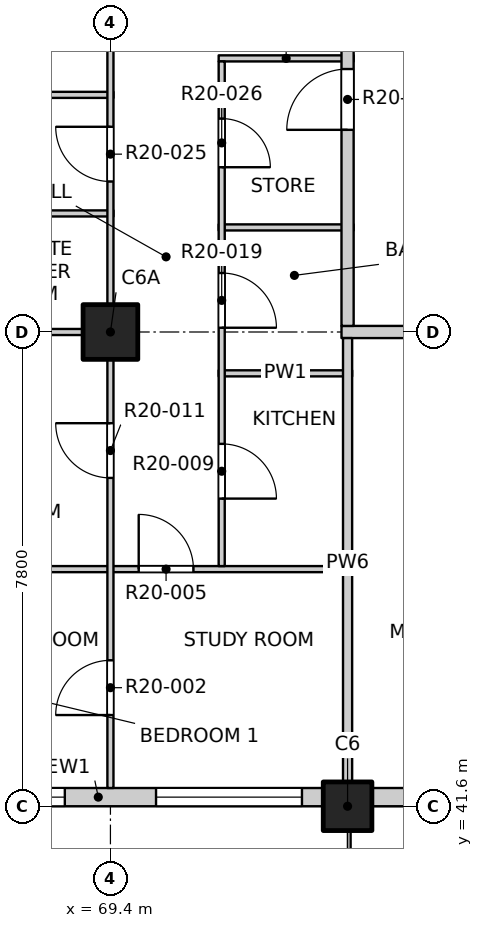
"""IFC4 building model, lengths in metres.
Left out: names, types, materials, properties, quantities, classifications, styles, units other than length and angle.
Written with IfcOpenShell. Run it as: python <this file> out.ifc"""

import sys

from ifc_helpers import new_model, si_unit, direction, frame, frame_2d, origin, origin_2d, place, context, subcontext, project, spatial, rectangle, extrude, element, fill, save


model = new_model("IFC4")
c1 = context("Model", 3, precision=1e-05, world=origin(), true_north=direction((0.0, 1.0)))
c2 = subcontext(c1, "Body", "Model", "MODEL_VIEW")
j1 = project(units=[si_unit("LENGTHUNIT", "METRE"), si_unit("PLANEANGLEUNIT", "RADIAN")], contexts=[c1])
p1 = place(None, origin())
s1 = spatial("IfcSite", under=j1, at=p1, CompositionType="ELEMENT")
p2 = place(p1, origin())
s2 = spatial("IfcBuilding", under=s1, at=p2, CompositionType="ELEMENT")
p3 = place(p2, frame((0.0, 0.0, 204.1)))
s3 = spatial("IfcBuildingStorey", under=s2, at=p3, CompositionType="ELEMENT", Elevation=204.1)
p4 = place(p3, frame((73.3, 41.6, -0.25), z_axis=(0.0, 0.0, 1.0), x_axis=(1.0, 0.0, 0.0)))
e1 = element("IfcColumn", 1, at=p4, inside=s3, PredefinedType="COLUMN", context=c2, shape_type="SweptSolid", body=[
    extrude(rectangle(XDim=0.8, YDim=0.8, at=origin_2d()), origin(), (0.0, 0.0, 1.0), 3.4),
])
p5 = place(p3, frame((69.4, 49.4, -0.25), z_axis=(0.0, 0.0, 1.0), x_axis=(1.0, 0.0, 0.0)))
e2 = element("IfcColumn", 2, at=p5, inside=s3, PredefinedType="COLUMN", context=c2, shape_type="SweptSolid", body=[
    extrude(rectangle(XDim=0.9, YDim=0.9, at=origin_2d()), origin(), (0.0, 0.0, 1.0), 3.4),
])
p6 = place(p3, frame((65.5, 41.75, 0.0), z_axis=(0.0, 0.0, 1.0), x_axis=(1.0, 0.0, 0.0)))
e3 = element("IfcWall", 3, at=p6, inside=s3, PredefinedType="SOLIDWALL", context=c2, shape_type="SweptSolid", body=[
    extrude(rectangle(XDim=7.4, YDim=0.3, at=frame_2d((3.7, 0.0))), origin(), (0.0, 0.0, 1.0), 2.7),
])
p7 = place(p6, frame((0.75, 0.0, 0.9)))
e4 = element("IfcOpeningElement", 4, at=p7, cuts=e3, PredefinedType="OPENING", context=c2, shape_type="SweptSolid", body=[
    extrude(rectangle(XDim=2.4, YDim=1.8, at=frame_2d((1.2, 0.9))), frame((0.0, 0.16, 0.0), z_axis=(0.0, -1.0, 0.0), x_axis=(1.0, 0.0, 0.0)), (0.0, 0.0, 1.0), 0.32),
])
p8 = place(p6, frame((4.65, 0.0, 0.9)))
e5 = element("IfcOpeningElement", 5, at=p8, cuts=e3, PredefinedType="OPENING", context=c2, shape_type="SweptSolid", body=[
    extrude(rectangle(XDim=2.4, YDim=1.8, at=frame_2d((1.2, 0.9))), frame((0.0, 0.16, 0.0), z_axis=(0.0, -1.0, 0.0), x_axis=(1.0, 0.0, 0.0)), (0.0, 0.0, 1.0), 0.32),
])
p9 = place(p3, frame((73.7, 41.75, 0.0), z_axis=(0.0, 0.0, 1.0), x_axis=(1.0, 0.0, 0.0)))
e6 = element("IfcWall", 6, at=p9, inside=s3, PredefinedType="SOLIDWALL", context=c2, shape_type="SweptSolid", body=[
    extrude(rectangle(XDim=7.0, YDim=0.3, at=frame_2d((3.5, 0.0))), origin(), (0.0, 0.0, 1.0), 2.7),
])
p10 = place(p9, frame((0.65, 0.0, 0.0)))
e7 = element("IfcOpeningElement", 7, at=p10, cuts=e6, PredefinedType="OPENING", context=c2, shape_type="SweptSolid", body=[
    extrude(rectangle(XDim=1.8, YDim=2.4, at=frame_2d((0.9, 1.2))), frame((0.0, 0.16, 0.0), z_axis=(0.0, -1.0, 0.0), x_axis=(1.0, 0.0, 0.0)), (0.0, 0.0, 1.0), 0.32),
])
p11 = place(p9, frame((4.25, 0.0, 0.9)))
e8 = element("IfcOpeningElement", 8, at=p11, cuts=e6, PredefinedType="OPENING", context=c2, shape_type="SweptSolid", body=[
    extrude(rectangle(XDim=2.4, YDim=1.8, at=frame_2d((1.2, 0.9))), frame((0.0, 0.16, 0.0), z_axis=(0.0, -1.0, 0.0), x_axis=(1.0, 0.0, 0.0)), (0.0, 0.0, 1.0), 0.32),
])
p12 = place(p3, frame((61.9, 45.5, 0.0), z_axis=(0.0, 0.0, 1.0), x_axis=(1.0, 0.0, 0.0)))
e9 = element("IfcWall", 9, at=p12, inside=s3, PredefinedType="PARTITIONING", context=c2, shape_type="SweptSolid", body=[
    extrude(rectangle(XDim=11.475, YDim=0.1, at=frame_2d((5.737, 0.0))), origin(), (0.0, 0.0, 1.0), 3.15),
])
p13 = place(p12, frame((7.965, 0.0, 0.0)))
e10 = element("IfcOpeningElement", 10, at=p13, cuts=e9, PredefinedType="OPENING", context=c2, shape_type="SweptSolid", body=[
    extrude(rectangle(XDim=0.9, YDim=2.1, at=frame_2d((0.45, 1.05))), frame((0.0, 0.06, 0.0), z_axis=(0.0, -1.0, 0.0), x_axis=(1.0, 0.0, 0.0)), (0.0, 0.0, 1.0), 0.12),
])
p14 = place(p3, frame((71.18, 48.72, 0.0), z_axis=(0.0, 0.0, 1.0), x_axis=(1.0, 0.0, 0.0)))
e11 = element("IfcWall", 11, at=p14, inside=s3, PredefinedType="PARTITIONING", context=c2, shape_type="SweptSolid", body=[
    extrude(rectangle(XDim=2.195, YDim=0.1, at=frame_2d((1.097, 0.0))), origin(), (0.0, 0.0, 1.0), 3.15),
])
p15 = place(p3, frame((61.9, 49.4, 0.0), z_axis=(0.0, 0.0, 1.0), x_axis=(1.0, 0.0, 0.0)))
e12 = element("IfcWall", 12, at=p15, inside=s3, PredefinedType="PARTITIONING", context=c2, shape_type="SweptSolid", body=[
    extrude(rectangle(XDim=7.55, YDim=0.1, at=frame_2d((3.775, 0.0))), origin(), (0.0, 0.0, 1.0), 3.15),
])
p16 = place(p3, frame((73.2, 49.4, 0.0), z_axis=(0.0, 0.0, 1.0), x_axis=(1.0, 0.0, 0.0)))
e13 = element("IfcWall", 13, at=p16, inside=s3, PredefinedType="PARTITIONING", context=c2, shape_type="SweptSolid", body=[
    extrude(rectangle(XDim=23.6, YDim=0.2, at=frame_2d((11.8, 0.0))), origin(), (0.0, 0.0, 1.0), 3.15),
])
p17 = place(p16, frame((1.6, 0.0, 0.0)))
e14 = element("IfcOpeningElement", 14, at=p17, cuts=e13, PredefinedType="OPENING", context=c2, shape_type="SweptSolid", body=[
    extrude(rectangle(XDim=0.9, YDim=2.1, at=frame_2d((0.45, 1.05))), frame((0.0, 0.11, 0.0), z_axis=(0.0, -1.0, 0.0), x_axis=(1.0, 0.0, 0.0)), (0.0, 0.0, 1.0), 0.22),
])
p18 = place(p16, frame((5.5, 0.0, 0.0)))
e15 = element("IfcOpeningElement", 15, at=p18, cuts=e13, PredefinedType="OPENING", context=c2, shape_type="SweptSolid", body=[
    extrude(rectangle(XDim=0.9, YDim=2.1, at=frame_2d((0.45, 1.05))), frame((0.0, 0.11, 0.0), z_axis=(0.0, -1.0, 0.0), x_axis=(1.0, 0.0, 0.0)), (0.0, 0.0, 1.0), 0.22),
])
p19 = place(p16, frame((12.375, 0.0, 0.0)))
e16 = element("IfcOpeningElement", 16, at=p19, cuts=e13, PredefinedType="OPENING", context=c2, shape_type="SweptSolid", body=[
    extrude(rectangle(XDim=1.2, YDim=2.1, at=frame_2d((0.6, 1.05))), frame((0.0, 0.11, 0.0), z_axis=(0.0, -1.0, 0.0), x_axis=(1.0, 0.0, 0.0)), (0.0, 0.0, 1.0), 0.22),
])
p20 = place(p16, frame((20.15, 0.0, 0.0)))
e17 = element("IfcOpeningElement", 17, at=p20, cuts=e13, PredefinedType="OPENING", context=c2, shape_type="SweptSolid", body=[
    extrude(rectangle(XDim=1.2, YDim=2.1, at=frame_2d((0.6, 1.05))), frame((0.0, 0.11, 0.0), z_axis=(0.0, -1.0, 0.0), x_axis=(1.0, 0.0, 0.0)), (0.0, 0.0, 1.0), 0.22),
])
p21 = place(p3, frame((71.18, 51.12, 0.0), z_axis=(0.0, 0.0, 1.0), x_axis=(1.0, 0.0, 0.0)))
e18 = element("IfcWall", 18, at=p21, inside=s3, PredefinedType="PARTITIONING", context=c2, shape_type="SweptSolid", body=[
    extrude(rectangle(XDim=2.22, YDim=0.1, at=frame_2d((1.11, 0.0))), origin(), (0.0, 0.0, 1.0), 3.15),
])
p22 = place(p3, frame((66.05, 51.35, 0.0), z_axis=(0.0, 0.0, 1.0), x_axis=(1.0, 0.0, 0.0)))
e19 = element("IfcWall", 19, at=p22, inside=s3, PredefinedType="PARTITIONING", context=c2, shape_type="SweptSolid", body=[
    extrude(rectangle(XDim=3.4, YDim=0.1, at=frame_2d((1.7, 0.0))), origin(), (0.0, 0.0, 1.0), 3.15),
])
p23 = place(p3, frame((61.9, 53.3, 0.0), z_axis=(0.0, 0.0, 1.0), x_axis=(1.0, 0.0, 0.0)))
e20 = element("IfcWall", 20, at=p23, inside=s3, PredefinedType="PARTITIONING", context=c2, shape_type="SweptSolid", body=[
    extrude(rectangle(XDim=7.55, YDim=0.1, at=frame_2d((3.775, 0.0))), origin(), (0.0, 0.0, 1.0), 3.15),
])
p24 = place(p3, frame((71.18, 53.9, 0.0), z_axis=(0.0, 0.0, 1.0), x_axis=(1.0, 0.0, 0.0)))
e21 = element("IfcWall", 21, at=p24, inside=s3, PredefinedType="PARTITIONING", context=c2, shape_type="SweptSolid", body=[
    extrude(rectangle(XDim=2.22, YDim=0.1, at=frame_2d((1.11, 0.0))), origin(), (0.0, 0.0, 1.0), 3.15),
])
p25 = place(p3, frame((69.4, 41.9, 0.0), z_axis=(0.0, 0.0, 1.0), x_axis=(0.0, 1.0, 0.0)))
e22 = element("IfcWall", 22, at=p25, inside=s3, PredefinedType="PARTITIONING", context=c2, shape_type="SweptSolid", body=[
    extrude(rectangle(XDim=46.2, YDim=0.1, at=frame_2d((23.1, 0.0))), origin(), (0.0, 0.0, 1.0), 3.15),
])
p26 = place(p25, frame((1.2, 0.0, 0.0)))
e23 = element("IfcOpeningElement", 23, at=p26, cuts=e22, PredefinedType="OPENING", context=c2, shape_type="SweptSolid", body=[
    extrude(rectangle(XDim=0.9, YDim=2.1, at=frame_2d((0.45, 1.05))), frame((0.0, 0.06, 0.0), z_axis=(0.0, -1.0, 0.0), x_axis=(1.0, 0.0, 0.0)), (0.0, 0.0, 1.0), 0.12),
])
p27 = place(p25, frame((5.1, 0.0, 0.0)))
e24 = element("IfcOpeningElement", 24, at=p27, cuts=e22, PredefinedType="OPENING", context=c2, shape_type="SweptSolid", body=[
    extrude(rectangle(XDim=0.9, YDim=2.1, at=frame_2d((0.45, 1.05))), frame((0.0, 0.06, 0.0), z_axis=(0.0, -1.0, 0.0), x_axis=(1.0, 0.0, 0.0)), (0.0, 0.0, 1.0), 0.12),
])
p28 = place(p25, frame((9.975, 0.0, 0.0)))
e25 = element("IfcOpeningElement", 25, at=p28, cuts=e22, PredefinedType="OPENING", context=c2, shape_type="SweptSolid", body=[
    extrude(rectangle(XDim=0.9, YDim=2.1, at=frame_2d((0.45, 1.05))), frame((0.0, 0.06, 0.0), z_axis=(0.0, -1.0, 0.0), x_axis=(1.0, 0.0, 0.0)), (0.0, 0.0, 1.0), 0.12),
])
p29 = place(p25, frame((12.9, 0.0, 0.0)))
e26 = element("IfcOpeningElement", 26, at=p29, cuts=e22, PredefinedType="OPENING", context=c2, shape_type="SweptSolid", body=[
    extrude(rectangle(XDim=0.9, YDim=2.1, at=frame_2d((0.45, 1.05))), frame((0.0, 0.06, 0.0), z_axis=(0.0, -1.0, 0.0), x_axis=(1.0, 0.0, 0.0)), (0.0, 0.0, 1.0), 0.12),
])
p30 = place(p25, frame((17.775, 0.0, 0.0)))
e27 = element("IfcOpeningElement", 27, at=p30, cuts=e22, PredefinedType="OPENING", context=c2, shape_type="SweptSolid", body=[
    extrude(rectangle(XDim=0.9, YDim=2.1, at=frame_2d((0.45, 1.05))), frame((0.0, 0.06, 0.0), z_axis=(0.0, -1.0, 0.0), x_axis=(1.0, 0.0, 0.0)), (0.0, 0.0, 1.0), 0.12),
])
p31 = place(p25, frame((21.625, 0.0, 0.0)))
e28 = element("IfcOpeningElement", 28, at=p31, cuts=e22, PredefinedType="OPENING", context=c2, shape_type="SweptSolid", body=[
    extrude(rectangle(XDim=0.9, YDim=2.1, at=frame_2d((0.45, 1.05))), frame((0.0, 0.06, 0.0), z_axis=(0.0, -1.0, 0.0), x_axis=(1.0, 0.0, 0.0)), (0.0, 0.0, 1.0), 0.12),
])
p32 = place(p25, frame((24.6, 0.0, 0.0)))
e29 = element("IfcOpeningElement", 29, at=p32, cuts=e22, PredefinedType="OPENING", context=c2, shape_type="SweptSolid", body=[
    extrude(rectangle(XDim=0.9, YDim=2.1, at=frame_2d((0.45, 1.05))), frame((0.0, 0.06, 0.0), z_axis=(0.0, -1.0, 0.0), x_axis=(1.0, 0.0, 0.0)), (0.0, 0.0, 1.0), 0.12),
])
p33 = place(p25, frame((28.5, 0.0, 0.0)))
e30 = element("IfcOpeningElement", 30, at=p33, cuts=e22, PredefinedType="OPENING", context=c2, shape_type="SweptSolid", body=[
    extrude(rectangle(XDim=0.9, YDim=2.1, at=frame_2d((0.45, 1.05))), frame((0.0, 0.06, 0.0), z_axis=(0.0, -1.0, 0.0), x_axis=(1.0, 0.0, 0.0)), (0.0, 0.0, 1.0), 0.12),
])
p34 = place(p25, frame((33.375, 0.0, 0.0)))
e31 = element("IfcOpeningElement", 31, at=p34, cuts=e22, PredefinedType="OPENING", context=c2, shape_type="SweptSolid", body=[
    extrude(rectangle(XDim=0.9, YDim=2.1, at=frame_2d((0.45, 1.05))), frame((0.0, 0.06, 0.0), z_axis=(0.0, -1.0, 0.0), x_axis=(1.0, 0.0, 0.0)), (0.0, 0.0, 1.0), 0.12),
])
p35 = place(p25, frame((37.225, 0.0, 0.0)))
e32 = element("IfcOpeningElement", 32, at=p35, cuts=e22, PredefinedType="OPENING", context=c2, shape_type="SweptSolid", body=[
    extrude(rectangle(XDim=0.9, YDim=2.1, at=frame_2d((0.45, 1.05))), frame((0.0, 0.06, 0.0), z_axis=(0.0, -1.0, 0.0), x_axis=(1.0, 0.0, 0.0)), (0.0, 0.0, 1.0), 0.12),
])
p36 = place(p25, frame((40.2, 0.0, 0.0)))
e33 = element("IfcOpeningElement", 33, at=p36, cuts=e22, PredefinedType="OPENING", context=c2, shape_type="SweptSolid", body=[
    extrude(rectangle(XDim=0.9, YDim=2.1, at=frame_2d((0.45, 1.05))), frame((0.0, 0.06, 0.0), z_axis=(0.0, -1.0, 0.0), x_axis=(1.0, 0.0, 0.0)), (0.0, 0.0, 1.0), 0.12),
])
p37 = place(p25, frame((44.1, 0.0, 0.0)))
e34 = element("IfcOpeningElement", 34, at=p37, cuts=e22, PredefinedType="OPENING", context=c2, shape_type="SweptSolid", body=[
    extrude(rectangle(XDim=0.9, YDim=2.1, at=frame_2d((0.45, 1.05))), frame((0.0, 0.06, 0.0), z_axis=(0.0, -1.0, 0.0), x_axis=(1.0, 0.0, 0.0)), (0.0, 0.0, 1.0), 0.12),
])
p38 = place(p3, frame((71.23, 45.55, 0.0), z_axis=(0.0, 0.0, 1.0), x_axis=(0.0, 1.0, 0.0)))
e35 = element("IfcWall", 35, at=p38, inside=s3, PredefinedType="PARTITIONING", context=c2, shape_type="SweptSolid", body=[
    extrude(rectangle(XDim=8.3, YDim=0.1, at=frame_2d((4.15, 0.0))), origin(), (0.0, 0.0, 1.0), 3.15),
])
p39 = place(p38, frame((1.11, 0.0, 0.0)))
e36 = element("IfcOpeningElement", 36, at=p39, cuts=e35, PredefinedType="OPENING", context=c2, shape_type="SweptSolid", body=[
    extrude(rectangle(XDim=0.9, YDim=2.1, at=frame_2d((0.45, 1.05))), frame((0.0, 0.06, 0.0), z_axis=(0.0, -1.0, 0.0), x_axis=(1.0, 0.0, 0.0)), (0.0, 0.0, 1.0), 0.12),
])
p40 = place(p38, frame((3.92, 0.0, 0.0)))
e37 = element("IfcOpeningElement", 37, at=p40, cuts=e35, PredefinedType="OPENING", context=c2, shape_type="SweptSolid", body=[
    extrude(rectangle(XDim=0.9, YDim=2.1, at=frame_2d((0.45, 1.05))), frame((0.0, 0.06, 0.0), z_axis=(0.0, -1.0, 0.0), x_axis=(1.0, 0.0, 0.0)), (0.0, 0.0, 1.0), 0.12),
])
p41 = place(p38, frame((6.56, 0.0, 0.0)))
e38 = element("IfcOpeningElement", 38, at=p41, cuts=e35, PredefinedType="OPENING", context=c2, shape_type="SweptSolid", body=[
    extrude(rectangle(XDim=0.8, YDim=2.1, at=frame_2d((0.4, 1.05))), frame((0.0, 0.06, 0.0), z_axis=(0.0, -1.0, 0.0), x_axis=(1.0, 0.0, 0.0)), (0.0, 0.0, 1.0), 0.12),
])
p42 = place(p3, frame((73.3, 41.9, 0.0), z_axis=(0.0, 0.0, 1.0), x_axis=(0.0, 1.0, 0.0)))
e39 = element("IfcWall", 39, at=p42, inside=s3, PredefinedType="PARTITIONING", context=c2, shape_type="SweptSolid", body=[
    extrude(rectangle(XDim=7.4, YDim=0.15, at=frame_2d((3.7, 0.0))), origin(), (0.0, 0.0, 1.0), 3.15),
])
p43 = place(p3, frame((73.3, 49.5, 0.0), z_axis=(0.0, 0.0, 1.0), x_axis=(0.0, 1.0, 0.0)))
e40 = element("IfcWall", 40, at=p43, inside=s3, PredefinedType="PARTITIONING", context=c2, shape_type="SweptSolid", body=[
    extrude(rectangle(XDim=34.9, YDim=0.2, at=frame_2d((17.45, 0.0))), origin(), (0.0, 0.0, 1.0), 3.15),
])
p44 = place(p43, frame((3.225, 0.0, 0.0)))
e41 = element("IfcOpeningElement", 41, at=p44, cuts=e40, PredefinedType="OPENING", context=c2, shape_type="SweptSolid", body=[
    extrude(rectangle(XDim=1.0, YDim=2.1, at=frame_2d((0.5, 1.05))), frame((0.0, 0.11, 0.0), z_axis=(0.0, -1.0, 0.0), x_axis=(1.0, 0.0, 0.0)), (0.0, 0.0, 1.0), 0.22),
])
p45 = place(p43, frame((25.125, 0.0, 0.0)))
e42 = element("IfcOpeningElement", 42, at=p45, cuts=e40, PredefinedType="OPENING", context=c2, shape_type="SweptSolid", body=[
    extrude(rectangle(XDim=1.0, YDim=2.1, at=frame_2d((0.5, 1.05))), frame((0.0, 0.11, 0.0), z_axis=(0.0, -1.0, 0.0), x_axis=(1.0, 0.0, 0.0)), (0.0, 0.0, 1.0), 0.22),
])
p46 = place(p43, frame((31.475, 0.0, 0.0)))
e43 = element("IfcOpeningElement", 43, at=p46, cuts=e40, PredefinedType="OPENING", context=c2, shape_type="SweptSolid", body=[
    extrude(rectangle(XDim=1.0, YDim=2.1, at=frame_2d((0.5, 1.05))), frame((0.0, 0.11, 0.0), z_axis=(0.0, -1.0, 0.0), x_axis=(1.0, 0.0, 0.0)), (0.0, 0.0, 1.0), 0.22),
])
p47 = place(p7, origin())
e44 = element("IfcWindow", 44, at=p47, inside=s3, PartitioningType="DOUBLE_PANEL_VERTICAL", PredefinedType="WINDOW", context=c2, shape_type="SweptSolid", body=[
    extrude(rectangle(XDim=2.4, YDim=1.8, at=frame_2d((1.2, 0.9))), frame((0.0, 0.03, 0.0), z_axis=(0.0, -1.0, 0.0), x_axis=(1.0, 0.0, 0.0)), (0.0, 0.0, 1.0), 0.06),
])
fill(e4, e44)
p48 = place(p8, origin())
e45 = element("IfcWindow", 45, at=p48, inside=s3, PartitioningType="DOUBLE_PANEL_VERTICAL", PredefinedType="WINDOW", context=c2, shape_type="SweptSolid", body=[
    extrude(rectangle(XDim=2.4, YDim=1.8, at=frame_2d((1.2, 0.9))), frame((0.0, 0.03, 0.0), z_axis=(0.0, -1.0, 0.0), x_axis=(1.0, 0.0, 0.0)), (0.0, 0.0, 1.0), 0.06),
])
fill(e5, e45)
p49 = place(p26, origin())
e46 = element("IfcDoor", 46, at=p49, inside=s3, OperationType="SINGLE_SWING_LEFT", PredefinedType="DOOR", context=c2, shape_type="SweptSolid", body=[
    extrude(rectangle(XDim=0.9, YDim=2.1, at=frame_2d((0.45, 1.05))), frame((0.0, 0.025, 0.0), z_axis=(0.0, -1.0, 0.0), x_axis=(1.0, 0.0, 0.0)), (0.0, 0.0, 1.0), 0.05),
])
fill(e23, e46)
p50 = place(p13, origin())
e47 = element("IfcDoor", 47, at=p50, inside=s3, OperationType="SINGLE_SWING_LEFT", PredefinedType="DOOR", context=c2, shape_type="SweptSolid", body=[
    extrude(rectangle(XDim=0.9, YDim=2.1, at=frame_2d((0.45, 1.05))), frame((0.0, 0.025, 0.0), z_axis=(0.0, -1.0, 0.0), x_axis=(1.0, 0.0, 0.0)), (0.0, 0.0, 1.0), 0.05),
])
fill(e10, e47)
p51 = place(p39, origin())
e48 = element("IfcDoor", 48, at=p51, inside=s3, OperationType="SINGLE_SWING_RIGHT", PredefinedType="DOOR", context=c2, shape_type="SweptSolid", body=[
    extrude(rectangle(XDim=0.9, YDim=2.1, at=frame_2d((0.45, 1.05))), frame((0.0, 0.025, 0.0), z_axis=(0.0, -1.0, 0.0), x_axis=(1.0, 0.0, 0.0)), (0.0, 0.0, 1.0), 0.05),
])
fill(e36, e48)
p52 = place(p27, origin())
e49 = element("IfcDoor", 49, at=p52, inside=s3, OperationType="SINGLE_SWING_RIGHT", PredefinedType="DOOR", context=c2, shape_type="SweptSolid", body=[
    extrude(rectangle(XDim=0.9, YDim=2.1, at=frame_2d((0.45, 1.05))), frame((0.0, 0.025, 0.0), z_axis=(0.0, -1.0, 0.0), x_axis=(1.0, 0.0, 0.0)), (0.0, 0.0, 1.0), 0.05),
])
fill(e24, e49)
p53 = place(p40, origin())
e50 = element("IfcDoor", 50, at=p53, inside=s3, OperationType="SINGLE_SWING_RIGHT", PredefinedType="DOOR", context=c2, shape_type="SweptSolid", body=[
    extrude(rectangle(XDim=0.9, YDim=2.1, at=frame_2d((0.45, 1.05))), frame((0.0, 0.025, 0.0), z_axis=(0.0, -1.0, 0.0), x_axis=(1.0, 0.0, 0.0)), (0.0, 0.0, 1.0), 0.05),
])
fill(e37, e50)
p54 = place(p28, origin())
e51 = element("IfcDoor", 51, at=p54, inside=s3, OperationType="SINGLE_SWING_RIGHT", PredefinedType="DOOR", context=c2, shape_type="SweptSolid", body=[
    extrude(rectangle(XDim=0.9, YDim=2.1, at=frame_2d((0.45, 1.05))), frame((0.0, 0.025, 0.0), z_axis=(0.0, -1.0, 0.0), x_axis=(1.0, 0.0, 0.0)), (0.0, 0.0, 1.0), 0.05),
])
fill(e25, e51)
p55 = place(p41, origin())
e52 = element("IfcDoor", 52, at=p55, inside=s3, OperationType="SINGLE_SWING_RIGHT", PredefinedType="DOOR", context=c2, shape_type="SweptSolid", body=[
    extrude(rectangle(XDim=0.8, YDim=2.1, at=frame_2d((0.4, 1.05))), frame((0.0, 0.025, 0.0), z_axis=(0.0, -1.0, 0.0), x_axis=(1.0, 0.0, 0.0)), (0.0, 0.0, 1.0), 0.05),
])
fill(e38, e52)
p56 = place(p44, origin())
e53 = element("IfcDoor", 53, at=p56, inside=s3, OperationType="SINGLE_SWING_LEFT", PredefinedType="DOOR", context=c2, shape_type="SweptSolid", body=[
    extrude(rectangle(XDim=1.0, YDim=2.1, at=frame_2d((0.5, 1.05))), frame((0.0, 0.025, 0.0), z_axis=(0.0, -1.0, 0.0), x_axis=(1.0, 0.0, 0.0)), (0.0, 0.0, 1.0), 0.05),
])
fill(e41, e53)
save(model, sys.argv[1])
